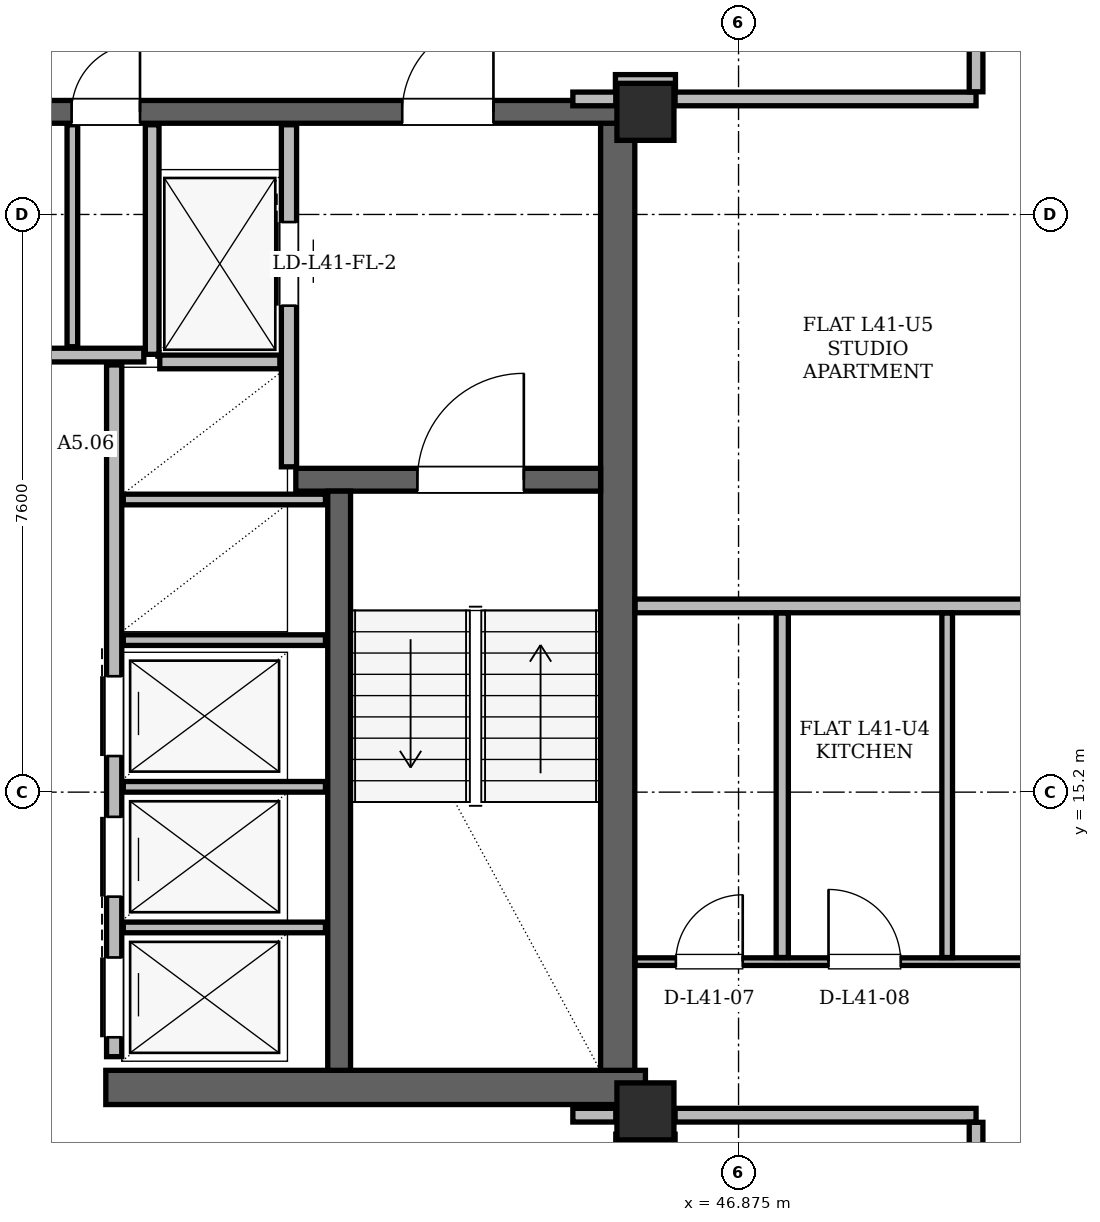
"""IFC4 building model, lengths in metres.
Left out: names, types, materials, properties, quantities, classifications, styles, units other than length and angle.
Written with IfcOpenShell. Run it as: python <this file> out.ifc"""

import sys

from ifc_helpers import new_model, si_unit, direction, frame, frame_2d, origin, origin_2d, place, context, subcontext, project, spatial, rectangle, hollow_rectangle, extrude, element, fill, save


model = new_model("IFC4")
c1 = context("Model", 3, precision=1e-05, world=origin(), true_north=direction((0.0, 1.0)))
c2 = subcontext(c1, "Body", "Model", "MODEL_VIEW")
j1 = project(units=[si_unit("LENGTHUNIT", "METRE"), si_unit("PLANEANGLEUNIT", "RADIAN")], contexts=[c1])
p1 = place(None, origin())
s1 = spatial("IfcSite", under=j1, at=p1, CompositionType="ELEMENT")
p2 = place(p1, origin())
s2 = spatial("IfcBuilding", under=s1, at=p2, CompositionType="ELEMENT")
p3 = place(p2, frame((0.0, 0.0, 156.6)))
s3 = spatial("IfcBuildingStorey", under=s2, at=p3, CompositionType="ELEMENT", Elevation=156.6)
for number, where, z_axis, x_axis in (
    (1, (45.65, 11.0, 0.0), (0.0, 0.0, 1.0), (1.0, 0.0, 0.0)),
    (2, (45.65, 24.15, 0.0), (0.0, 0.0, 1.0), (1.0, 0.0, 0.0)),
):
    element("IfcColumn", number, at=place(p3, frame(where, z_axis=z_axis, x_axis=x_axis)), inside=s3, PredefinedType="COLUMN", context=c2, shape_type="SweptSolid", body=[
        extrude(hollow_rectangle(XDim=0.75, YDim=0.75, WallThickness=0.06, at=origin_2d()), origin(), (0.0, 0.0, 1.0), 3.6),
    ])
p4 = place(p3, frame((45.285, 11.0, 0.0), z_axis=(0.0, 0.0, 1.0), x_axis=(0.0, 1.0, 0.0)))
e3 = element("IfcWall", 3, at=p4, inside=s3, PredefinedType="SHEAR", context=c2, shape_type="SweptSolid", body=[
    extrude(rectangle(XDim=13.3, YDim=0.45, at=frame_2d((6.65, 0.0))), origin(), (0.0, 0.0, 1.0), 3.38),
])
p5 = place(p3, frame((38.55, 11.315, 0.0), z_axis=(0.0, 0.0, 1.0), x_axis=(1.0, 0.0, 0.0)))
e4 = element("IfcWall", 4, at=p5, inside=s3, PredefinedType="SHEAR", context=c2, shape_type="SweptSolid", body=[
    extrude(rectangle(XDim=7.1, YDim=0.45, at=frame_2d((3.55, 0.0))), origin(), (0.0, 0.0, 1.0), 3.38),
])
p6 = place(p3, frame((29.65, 24.15, 0.0), z_axis=(0.0, 0.0, 1.0), x_axis=(1.0, 0.0, 0.0)))
e5 = element("IfcWall", 5, at=p6, inside=s3, PredefinedType="SHEAR", context=c2, shape_type="SweptSolid", body=[
    extrude(rectangle(XDim=15.7, YDim=0.3, at=frame_2d((7.85, 0.0))), origin(), (0.0, 0.0, 1.0), 3.38),
])
p7 = place(p6, frame((1.7, 0.0, 0.0)))
e6 = element("IfcOpeningElement", 6, at=p7, cuts=e5, PredefinedType="OPENING", context=c2, shape_type="SweptSolid", body=[
    extrude(rectangle(XDim=1.2, YDim=2.2, at=frame_2d((0.6, 1.1))), frame((0.0, 0.15, 0.0), z_axis=(0.0, -1.0, 0.0), x_axis=(1.0, 0.0, 0.0)), (0.0, 0.0, 1.0), 0.3),
])
p8 = place(p6, frame((12.8, 0.0, 0.0)))
e7 = element("IfcOpeningElement", 7, at=p8, cuts=e5, PredefinedType="OPENING", context=c2, shape_type="SweptSolid", body=[
    extrude(rectangle(XDim=1.2, YDim=2.2, at=frame_2d((0.6, 1.1))), frame((0.0, 0.15, 0.0), z_axis=(0.0, -1.0, 0.0), x_axis=(1.0, 0.0, 0.0)), (0.0, 0.0, 1.0), 0.3),
])
p9 = place(p6, frame((6.55, 0.0, 0.0)))
e8 = element("IfcOpeningElement", 8, at=p9, cuts=e5, PredefinedType="OPENING", context=c2, shape_type="SweptSolid", body=[
    extrude(rectangle(XDim=0.9, YDim=2.05, at=frame_2d((0.45, 1.025))), frame((0.0, 0.15, 0.0), z_axis=(0.0, -1.0, 0.0), x_axis=(1.0, 0.0, 0.0)), (0.0, 0.0, 1.0), 0.3),
])
p10 = place(p6, frame((8.45, 0.0, 0.0)))
e9 = element("IfcOpeningElement", 9, at=p10, cuts=e5, PredefinedType="OPENING", context=c2, shape_type="SweptSolid", body=[
    extrude(rectangle(XDim=0.9, YDim=2.05, at=frame_2d((0.45, 1.025))), frame((0.0, 0.15, 0.0), z_axis=(0.0, -1.0, 0.0), x_axis=(1.0, 0.0, 0.0)), (0.0, 0.0, 1.0), 0.3),
])
p11 = place(p3, frame((41.05, 19.31, 0.0), z_axis=(0.0, 0.0, 1.0), x_axis=(1.0, 0.0, 0.0)))
e10 = element("IfcWall", 10, at=p11, inside=s3, PredefinedType="SHEAR", context=c2, shape_type="SweptSolid", body=[
    extrude(rectangle(XDim=4.01, YDim=0.3, at=frame_2d((2.005, 0.0))), origin(), (0.0, 0.0, 1.0), 3.38),
])
p12 = place(p11, frame((1.6, 0.0, 0.0)))
e11 = element("IfcOpeningElement", 11, at=p12, cuts=e10, PredefinedType="OPENING", context=c2, shape_type="SweptSolid", body=[
    extrude(rectangle(XDim=1.4, YDim=2.2, at=frame_2d((0.7, 1.1))), frame((0.0, 0.15, 0.0), z_axis=(0.0, -1.0, 0.0), x_axis=(1.0, 0.0, 0.0)), (0.0, 0.0, 1.0), 0.3),
])
p13 = place(p3, frame((41.62, 11.54, 0.0), z_axis=(0.0, 0.0, 1.0), x_axis=(0.0, 1.0, 0.0)))
e12 = element("IfcWall", 12, at=p13, inside=s3, PredefinedType="SHEAR", context=c2, shape_type="SweptSolid", body=[
    extrude(rectangle(XDim=7.62, YDim=0.3, at=frame_2d((3.81, 0.0))), origin(), (0.0, 0.0, 1.0), 3.38),
])
p14 = place(p3, frame((59.902, 12.477, 0.0), z_axis=(0.0, 0.0, 1.0), x_axis=(-0.499998839087, 0.866026074037, 0.0)))
e13 = element("IfcWall", 13, at=p14, inside=s3, PredefinedType="SOLIDWALL", context=c2, shape_type="SweptSolid", body=[
    extrude(rectangle(XDim=35.606, YDim=0.34, at=frame_2d((17.803, 0.0))), origin(), (0.0, 0.0, 1.0), 2.6),
])
p15 = place(p14, frame((7.615, 0.0, 0.0)))
e14 = element("IfcOpeningElement", 14, at=p15, cuts=e13, PredefinedType="OPENING", context=c2, shape_type="SweptSolid", body=[
    extrude(rectangle(XDim=1.5, YDim=2.2, at=frame_2d((0.75, 1.1))), frame((0.0, 0.17, 0.0), z_axis=(0.0, -1.0, 0.0), x_axis=(1.0, 0.0, 0.0)), (0.0, 0.0, 1.0), 0.34),
])
p16 = place(p14, frame((30.887, 0.0, 0.0)))
e15 = element("IfcOpeningElement", 15, at=p16, cuts=e13, PredefinedType="OPENING", context=c2, shape_type="SweptSolid", body=[
    extrude(rectangle(XDim=1.5, YDim=2.2, at=frame_2d((0.75, 1.1))), frame((0.0, 0.17, 0.0), z_axis=(0.0, -1.0, 0.0), x_axis=(1.0, 0.0, 0.0)), (0.0, 0.0, 1.0), 0.34),
])
p17 = place(p14, frame((0.903, 0.0, 0.85)))
e16 = element("IfcOpeningElement", 16, at=p17, cuts=e13, PredefinedType="OPENING", context=c2, shape_type="SweptSolid", body=[
    extrude(rectangle(XDim=1.2, YDim=1.48, at=frame_2d((0.6, 0.74))), frame((0.0, 0.17, 0.0), z_axis=(0.0, -1.0, 0.0), x_axis=(1.0, 0.0, 0.0)), (0.0, 0.0, 1.0), 0.34),
])
p18 = place(p14, frame((17.144, 0.0, 0.85)))
e17 = element("IfcOpeningElement", 17, at=p18, cuts=e13, PredefinedType="OPENING", context=c2, shape_type="SweptSolid", body=[
    extrude(rectangle(XDim=2.6, YDim=1.64, at=frame_2d((1.3, 0.82))), frame((0.0, 0.17, 0.0), z_axis=(0.0, -1.0, 0.0), x_axis=(1.0, 0.0, 0.0)), (0.0, 0.0, 1.0), 0.34),
])
p19 = place(p14, frame((22.144, 0.0, 0.85)))
e18 = element("IfcOpeningElement", 18, at=p19, cuts=e13, PredefinedType="OPENING", context=c2, shape_type="SweptSolid", body=[
    extrude(rectangle(XDim=2.0, YDim=1.64, at=frame_2d((1.0, 0.82))), frame((0.0, 0.17, 0.0), z_axis=(0.0, -1.0, 0.0), x_axis=(1.0, 0.0, 0.0)), (0.0, 0.0, 1.0), 0.34),
])
p20 = place(p14, frame((13.335, 0.0, 0.85)))
e19 = element("IfcOpeningElement", 19, at=p20, cuts=e13, PredefinedType="OPENING", context=c2, shape_type="SweptSolid", body=[
    extrude(rectangle(XDim=1.6, YDim=1.64, at=frame_2d((0.8, 0.82))), frame((0.0, 0.17, 0.0), z_axis=(0.0, -1.0, 0.0), x_axis=(1.0, 0.0, 0.0)), (0.0, 0.0, 1.0), 0.34),
])
p21 = place(p14, frame((25.813, 0.0, 0.85)))
e20 = element("IfcOpeningElement", 20, at=p21, cuts=e13, PredefinedType="OPENING", context=c2, shape_type="SweptSolid", body=[
    extrude(rectangle(XDim=1.6, YDim=1.64, at=frame_2d((0.8, 0.82))), frame((0.0, 0.17, 0.0), z_axis=(0.0, -1.0, 0.0), x_axis=(1.0, 0.0, 0.0)), (0.0, 0.0, 1.0), 0.34),
])
p22 = place(p14, frame((33.272, 0.0, 0.85)))
e21 = element("IfcOpeningElement", 21, at=p22, cuts=e13, PredefinedType="OPENING", context=c2, shape_type="SweptSolid", body=[
    extrude(rectangle(XDim=1.2, YDim=1.48, at=frame_2d((0.6, 0.74))), frame((0.0, 0.17, 0.0), z_axis=(0.0, -1.0, 0.0), x_axis=(1.0, 0.0, 0.0)), (0.0, 0.0, 1.0), 0.34),
])
p23 = place(p3, frame((40.96, 19.48, 0.0), z_axis=(0.0, 0.0, 1.0), x_axis=(0.0, 1.0, 0.0)))
e22 = element("IfcWall", 22, at=p23, inside=s3, PredefinedType="PARTITIONING", context=c2, shape_type="SweptSolid", body=[
    extrude(rectangle(XDim=4.5, YDim=0.2, at=frame_2d((2.25, 0.0))), origin(), (0.0, 0.0, 1.0), 2.42),
])
p24 = place(p23, frame((2.12, 0.0, 0.0)))
e23 = element("IfcOpeningElement", 23, at=p24, cuts=e22, PredefinedType="OPENING", context=c2, shape_type="SweptSolid", body=[
    extrude(rectangle(XDim=1.1, YDim=2.2, at=frame_2d((0.55, 1.1))), frame((0.0, 0.1, 0.0), z_axis=(0.0, -1.0, 0.0), x_axis=(1.0, 0.0, 0.0)), (0.0, 0.0, 1.0), 0.2),
])
p25 = place(p3, frame((39.16, 20.96, 0.0), z_axis=(0.0, 0.0, 1.0), x_axis=(0.0, 1.0, 0.0)))
e24 = element("IfcWall", 24, at=p25, inside=s3, PredefinedType="PARTITIONING", context=c2, shape_type="SweptSolid", body=[
    extrude(rectangle(XDim=3.02, YDim=0.18, at=frame_2d((1.51, 0.0))), origin(), (0.0, 0.0, 1.0), 2.42),
])
p26 = place(p3, frame((39.26, 20.86, 0.0), z_axis=(0.0, 0.0, 1.0), x_axis=(1.0, 0.0, 0.0)))
e25 = element("IfcWall", 25, at=p26, inside=s3, PredefinedType="PARTITIONING", context=c2, shape_type="SweptSolid", body=[
    extrude(rectangle(XDim=1.58, YDim=0.18, at=frame_2d((0.79, 0.0))), origin(), (0.0, 0.0, 1.0), 3.38),
])
p27 = place(p3, frame((38.66, 11.72, 0.0), z_axis=(0.0, 0.0, 1.0), x_axis=(0.0, 1.0, 0.0)))
e26 = element("IfcWall", 26, at=p27, inside=s3, PredefinedType="PARTITIONING", context=c2, shape_type="SweptSolid", body=[
    extrude(rectangle(XDim=9.1, YDim=0.2, at=frame_2d((4.55, 0.0))), origin(), (0.0, 0.0, 1.0), 3.38),
])
p28 = place(p27, frame((0.255, 0.0, 0.0)))
e27 = element("IfcOpeningElement", 27, at=p28, cuts=e26, PredefinedType="OPENING", context=c2, shape_type="SweptSolid", body=[
    extrude(rectangle(XDim=1.05, YDim=2.15, at=frame_2d((0.525, 1.075))), frame((0.0, 0.1, 0.0), z_axis=(0.0, -1.0, 0.0), x_axis=(1.0, 0.0, 0.0)), (0.0, 0.0, 1.0), 0.2),
])
p29 = place(p27, frame((2.105, 0.0, 0.0)))
e28 = element("IfcOpeningElement", 28, at=p29, cuts=e26, PredefinedType="OPENING", context=c2, shape_type="SweptSolid", body=[
    extrude(rectangle(XDim=1.05, YDim=2.15, at=frame_2d((0.525, 1.075))), frame((0.0, 0.1, 0.0), z_axis=(0.0, -1.0, 0.0), x_axis=(1.0, 0.0, 0.0)), (0.0, 0.0, 1.0), 0.2),
])
p30 = place(p27, frame((3.955, 0.0, 0.0)))
e29 = element("IfcOpeningElement", 29, at=p30, cuts=e26, PredefinedType="OPENING", context=c2, shape_type="SweptSolid", body=[
    extrude(rectangle(XDim=1.05, YDim=2.15, at=frame_2d((0.525, 1.075))), frame((0.0, 0.1, 0.0), z_axis=(0.0, -1.0, 0.0), x_axis=(1.0, 0.0, 0.0)), (0.0, 0.0, 1.0), 0.2),
])
for number, where, z_axis, x_axis in (
    (30, (38.78, 13.42, 0.0), (0.0, 0.0, 1.0), (1.0, 0.0, 0.0)),
    (31, (38.78, 15.27, 0.0), (0.0, 0.0, 1.0), (1.0, 0.0, 0.0)),
    (32, (38.78, 17.2, 0.0), (0.0, 0.0, 1.0), (1.0, 0.0, 0.0)),
    (33, (38.78, 19.05, 0.0), (0.0, 0.0, 1.0), (1.0, 0.0, 0.0)),
):
    element("IfcWall", number, at=place(p3, frame(where, z_axis=z_axis, x_axis=x_axis)), inside=s3, PredefinedType="PARTITIONING", context=c2, shape_type="SweptSolid", body=[
        extrude(rectangle(XDim=2.66, YDim=0.14, at=frame_2d((1.33, 0.0))), origin(), (0.0, 0.0, 1.0), 3.38),
    ])
p31 = place(p3, frame((35.95, 20.95, 0.0), z_axis=(0.0, 0.0, 1.0), x_axis=(1.0, 0.0, 0.0)))
e34 = element("IfcWall", 34, at=p31, inside=s3, PredefinedType="PARTITIONING", context=c2, shape_type="SweptSolid", body=[
    extrude(rectangle(XDim=3.1, YDim=0.18, at=frame_2d((1.55, 0.0))), origin(), (0.0, 0.0, 1.0), 3.38),
])
p32 = place(p3, frame((38.11, 21.06, 0.0), z_axis=(0.0, 0.0, 1.0), x_axis=(0.0, 1.0, 0.0)))
e35 = element("IfcWall", 35, at=p32, inside=s3, PredefinedType="PARTITIONING", context=c2, shape_type="SweptSolid", body=[
    extrude(rectangle(XDim=2.92, YDim=0.14, at=frame_2d((1.46, 0.0))), origin(), (0.0, 0.0, 1.0), 2.42),
])
p33 = place(p3, frame((45.26, 10.61, 0.0), z_axis=(0.0, 0.0, 1.0), x_axis=(1.0, 0.0, 0.0)))
e36 = element("IfcWall", 36, at=p33, inside=s3, PredefinedType="PARTITIONING", context=c2, shape_type="SweptSolid", body=[
    extrude(rectangle(XDim=0.78, YDim=0.18, at=frame_2d((0.39, 0.0))), origin(), (0.0, 0.0, 1.0), 3.38),
])
p34 = place(p3, frame((44.695, 10.95, 0.0), z_axis=(0.0, 0.0, 1.0), x_axis=(1.0, 0.0, 0.0)))
e37 = element("IfcWall", 37, at=p34, inside=s3, PredefinedType="PARTITIONING", context=c2, shape_type="SweptSolid", body=[
    extrude(rectangle(XDim=0.565, YDim=0.18, at=frame_2d((0.282, 0.0))), origin(), (0.0, 0.0, 1.0), 2.42),
])
p35 = place(p3, frame((46.04, 10.95, 0.0), z_axis=(0.0, 0.0, 1.0), x_axis=(1.0, 0.0, 0.0)))
e38 = element("IfcWall", 38, at=p35, inside=s3, PredefinedType="PARTITIONING", context=c2, shape_type="SweptSolid", body=[
    extrude(rectangle(XDim=3.96, YDim=0.18, at=frame_2d((1.98, 0.0))), origin(), (0.0, 0.0, 1.0), 2.842),
])
p36 = place(p3, frame((45.514, 12.97, 0.0), z_axis=(0.0, 0.0, 1.0), x_axis=(1.0, 0.0, 0.0)))
e39 = element("IfcWall", 39, at=p36, inside=s3, PredefinedType="PARTITIONING", context=c2, shape_type="SweptSolid", body=[
    extrude(rectangle(XDim=13.903, YDim=0.1, at=frame_2d((6.951, 0.0))), origin(), (0.0, 0.0, 1.0), 2.42),
])
p37 = place(p36, frame((0.536, 0.0, 0.0)))
e40 = element("IfcOpeningElement", 40, at=p37, cuts=e39, PredefinedType="OPENING", context=c2, shape_type="SweptSolid", body=[
    extrude(rectangle(XDim=0.88, YDim=2.08, at=frame_2d((0.44, 1.04))), frame((0.0, 0.05, 0.0), z_axis=(0.0, -1.0, 0.0), x_axis=(1.0, 0.0, 0.0)), (0.0, 0.0, 1.0), 0.1),
])
p38 = place(p36, frame((2.545, 0.0, 0.0)))
e41 = element("IfcOpeningElement", 41, at=p38, cuts=e39, PredefinedType="OPENING", context=c2, shape_type="SweptSolid", body=[
    extrude(rectangle(XDim=0.95, YDim=2.1, at=frame_2d((0.475, 1.05))), frame((0.0, 0.05, 0.0), z_axis=(0.0, -1.0, 0.0), x_axis=(1.0, 0.0, 0.0)), (0.0, 0.0, 1.0), 0.1),
])
p39 = place(p36, frame((8.571, 0.0, 0.0)))
e42 = element("IfcOpeningElement", 42, at=p39, cuts=e39, PredefinedType="OPENING", context=c2, shape_type="SweptSolid", body=[
    extrude(rectangle(XDim=0.92, YDim=2.12, at=frame_2d((0.46, 1.06))), frame((0.0, 0.05, 0.0), z_axis=(0.0, -1.0, 0.0), x_axis=(1.0, 0.0, 0.0)), (0.0, 0.0, 1.0), 0.1),
])
p40 = place(p3, frame((45.514, 17.65, 0.0), z_axis=(0.0, 0.0, 1.0), x_axis=(1.0, 0.0, 0.0)))
e43 = element("IfcWall", 43, at=p40, inside=s3, PredefinedType="PARTITIONING", context=c2, shape_type="SweptSolid", body=[
    extrude(rectangle(XDim=11.201, YDim=0.18, at=frame_2d((5.6, 0.0))), origin(), (0.0, 0.0, 1.0), 2.42),
])
p41 = place(p3, frame((44.695, 24.32, 0.0), z_axis=(0.0, 0.0, 1.0), x_axis=(1.0, 0.0, 0.0)))
e44 = element("IfcWall", 44, at=p41, inside=s3, PredefinedType="PARTITIONING", context=c2, shape_type="SweptSolid", body=[
    extrude(rectangle(XDim=0.565, YDim=0.18, at=frame_2d((0.282, 0.0))), origin(), (0.0, 0.0, 1.0), 2.42),
])
p42 = place(p3, frame((46.04, 24.32, 0.0), z_axis=(0.0, 0.0, 1.0), x_axis=(1.0, 0.0, 0.0)))
e45 = element("IfcWall", 45, at=p42, inside=s3, PredefinedType="PARTITIONING", context=c2, shape_type="SweptSolid", body=[
    extrude(rectangle(XDim=3.96, YDim=0.18, at=frame_2d((1.98, 0.0))), origin(), (0.0, 0.0, 1.0), 3.38),
])
p43 = place(p3, frame((45.255, 24.55, 0.0), z_axis=(0.0, 0.0, 1.0), x_axis=(1.0, 0.0, 0.0)))
e46 = element("IfcWall", 46, at=p43, inside=s3, PredefinedType="PARTITIONING", context=c2, shape_type="SweptSolid", body=[
    extrude(rectangle(XDim=0.79, YDim=0.18, at=frame_2d((0.395, 0.0))), origin(), (0.0, 0.0, 1.0), 2.842),
])
p44 = place(p3, frame((47.45, 13.024, 0.0), z_axis=(0.0, 0.0, 1.0), x_axis=(0.0, 1.0, 0.0)))
e47 = element("IfcWall", 47, at=p44, inside=s3, PredefinedType="PARTITIONING", context=c2, shape_type="SweptSolid", body=[
    extrude(rectangle(XDim=4.532, YDim=0.16, at=frame_2d((2.266, 0.0))), origin(), (0.0, 0.0, 1.0), 3.38),
])
p45 = place(p3, frame((49.62, 13.024, 0.0), z_axis=(0.0, 0.0, 1.0), x_axis=(0.0, 1.0, 0.0)))
e48 = element("IfcWall", 48, at=p45, inside=s3, PredefinedType="PARTITIONING", context=c2, shape_type="SweptSolid", body=[
    extrude(rectangle(XDim=4.532, YDim=0.14, at=frame_2d((2.266, 0.0))), origin(), (0.0, 0.0, 1.0), 3.38),
])
for number, where, z_axis, x_axis in (
    (49, (50.0, 9.394, 0.0), (0.0, 0.0, 1.0), (0.0, 1.0, 0.0)),
    (50, (50.0, 24.414, 0.0), (0.0, 0.0, 1.0), (0.0, 1.0, 0.0)),
):
    element("IfcWall", number, at=place(p3, frame(where, z_axis=z_axis, x_axis=x_axis)), inside=s3, PredefinedType="PARTITIONING", context=c2, shape_type="SweptSolid", body=[
        extrude(rectangle(XDim=1.462, YDim=0.18, at=frame_2d((0.731, 0.0))), origin(), (0.0, 0.0, 1.0), 3.38),
    ])
p46 = place(p24, origin())
e51 = element("IfcDoor", 51, at=p46, inside=s3, OperationType="SLIDING_TO_RIGHT", PredefinedType="DOOR", context=c2, shape_type="SweptSolid", body=[
    extrude(rectangle(XDim=1.1, YDim=2.2, at=frame_2d((0.55, 1.1))), frame((0.0, 0.025, 0.0), z_axis=(0.0, -1.0, 0.0), x_axis=(1.0, 0.0, 0.0)), (0.0, 0.0, 1.0), 0.05),
])
fill(e23, e51)
p47 = place(p28, origin())
e52 = element("IfcDoor", 52, at=p47, inside=s3, OperationType="SLIDING_TO_RIGHT", PredefinedType="DOOR", context=c2, shape_type="SweptSolid", body=[
    extrude(rectangle(XDim=1.05, YDim=2.15, at=frame_2d((0.525, 1.075))), frame((0.0, 0.025, 0.0), z_axis=(0.0, -1.0, 0.0), x_axis=(1.0, 0.0, 0.0)), (0.0, 0.0, 1.0), 0.05),
])
fill(e27, e52)
p48 = place(p29, origin())
e53 = element("IfcDoor", 53, at=p48, inside=s3, OperationType="SLIDING_TO_LEFT", PredefinedType="DOOR", context=c2, shape_type="SweptSolid", body=[
    extrude(rectangle(XDim=1.05, YDim=2.15, at=frame_2d((0.525, 1.075))), frame((0.0, 0.025, 0.0), z_axis=(0.0, -1.0, 0.0), x_axis=(1.0, 0.0, 0.0)), (0.0, 0.0, 1.0), 0.05),
])
fill(e28, e53)
p49 = place(p30, origin())
e54 = element("IfcDoor", 54, at=p49, inside=s3, OperationType="SLIDING_TO_RIGHT", PredefinedType="DOOR", context=c2, shape_type="SweptSolid", body=[
    extrude(rectangle(XDim=1.05, YDim=2.15, at=frame_2d((0.525, 1.075))), frame((0.0, 0.025, 0.0), z_axis=(0.0, -1.0, 0.0), x_axis=(1.0, 0.0, 0.0)), (0.0, 0.0, 1.0), 0.05),
])
fill(e29, e54)
p50 = place(p12, origin())
e55 = element("IfcDoor", 55, at=p50, inside=s3, OperationType="SINGLE_SWING_RIGHT", PredefinedType="DOOR", context=c2, shape_type="SweptSolid", body=[
    extrude(rectangle(XDim=1.4, YDim=2.2, at=frame_2d((0.7, 1.1))), frame((0.0, 0.025, 0.0), z_axis=(0.0, -1.0, 0.0), x_axis=(1.0, 0.0, 0.0)), (0.0, 0.0, 1.0), 0.05),
])
fill(e11, e55)
p51 = place(p8, origin())
e56 = element("IfcDoor", 56, at=p51, inside=s3, OperationType="SINGLE_SWING_RIGHT", PredefinedType="DOOR", context=c2, shape_type="SweptSolid", body=[
    extrude(rectangle(XDim=1.2, YDim=2.2, at=frame_2d((0.6, 1.1))), frame((0.0, 0.025, 0.0), z_axis=(0.0, -1.0, 0.0), x_axis=(1.0, 0.0, 0.0)), (0.0, 0.0, 1.0), 0.05),
])
fill(e7, e56)
p52 = place(p10, origin())
e57 = element("IfcDoor", 57, at=p52, inside=s3, OperationType="SINGLE_SWING_RIGHT", PredefinedType="DOOR", context=c2, shape_type="SweptSolid", body=[
    extrude(rectangle(XDim=0.9, YDim=2.05, at=frame_2d((0.45, 1.025))), frame((0.0, 0.025, 0.0), z_axis=(0.0, -1.0, 0.0), x_axis=(1.0, 0.0, 0.0)), (0.0, 0.0, 1.0), 0.05),
])
fill(e9, e57)
p53 = place(p37, origin())
e58 = element("IfcDoor", 58, at=p53, inside=s3, OperationType="SINGLE_SWING_RIGHT", PredefinedType="DOOR", context=c2, shape_type="SweptSolid", body=[
    extrude(rectangle(XDim=0.88, YDim=2.08, at=frame_2d((0.44, 1.04))), frame((0.0, 0.025, 0.0), z_axis=(0.0, -1.0, 0.0), x_axis=(1.0, 0.0, 0.0)), (0.0, 0.0, 1.0), 0.05),
])
fill(e40, e58)
p54 = place(p38, origin())
e59 = element("IfcDoor", 59, at=p54, inside=s3, OperationType="SINGLE_SWING_LEFT", PredefinedType="DOOR", context=c2, shape_type="SweptSolid", body=[
    extrude(rectangle(XDim=0.95, YDim=2.1, at=frame_2d((0.475, 1.05))), frame((0.0, 0.025, 0.0), z_axis=(0.0, -1.0, 0.0), x_axis=(1.0, 0.0, 0.0)), (0.0, 0.0, 1.0), 0.05),
])
fill(e41, e59)
save(model, sys.argv[1])
